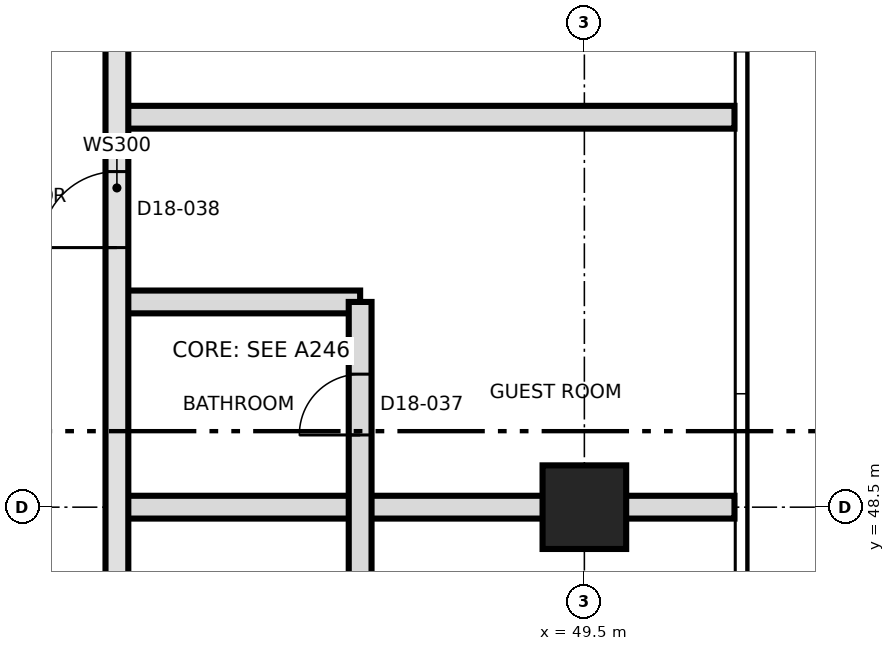
"""IFC4 building model, lengths in metres.
Left out: names, types, materials, properties, quantities, classifications, styles, units other than length and angle.
Written with IfcOpenShell. Run it as: python <this file> out.ifc"""

import sys

from ifc_helpers import new_model, si_unit, direction, frame, frame_2d, origin, origin_2d, place, context, subcontext, project, spatial, rectangle, extrude, element, fill, save


model = new_model("IFC4")
c1 = context("Model", 3, precision=1e-05, world=origin(), true_north=direction((0.0, 1.0)))
c2 = subcontext(c1, "Body", "Model", "MODEL_VIEW")
j1 = project(units=[si_unit("LENGTHUNIT", "METRE"), si_unit("PLANEANGLEUNIT", "RADIAN")], contexts=[c1])
p1 = place(None, origin())
s1 = spatial("IfcSite", under=j1, at=p1, CompositionType="ELEMENT")
p2 = place(p1, origin())
s2 = spatial("IfcBuilding", under=s1, at=p2, CompositionType="ELEMENT")
p3 = place(p2, frame((0.0, 0.0, 175.5)))
s3 = spatial("IfcBuildingStorey", under=s2, at=p3, CompositionType="ELEMENT", Elevation=175.5)
p4 = place(p3, frame((49.5, 48.5, 0.0), z_axis=(0.0, 0.0, 1.0), x_axis=(1.0, 0.0, 0.0)))
e1 = element("IfcColumn", 1, at=p4, inside=s3, PredefinedType="COLUMN", context=c2, shape_type="SweptSolid", body=[
    extrude(rectangle(XDim=1.1, YDim=1.1, at=origin_2d()), origin(), (0.0, 0.0, 1.0), 3.7),
])
p5 = place(p3, frame((43.35, 48.5, 0.0), z_axis=(0.0, 0.0, 1.0), x_axis=(1.0, 0.0, 0.0)))
e2 = element("IfcWall", 2, at=p5, inside=s3, PredefinedType="PARTITIONING", context=c2, shape_type="SweptSolid", body=[
    extrude(rectangle(XDim=8.125, YDim=0.3, at=frame_2d((4.062, 0.0))), origin(), (0.0, 0.0, 1.0), 3.4),
])
p6 = place(p3, frame((43.35, 51.2, 0.0), z_axis=(0.0, 0.0, 1.0), x_axis=(1.0, 0.0, 0.0)))
e3 = element("IfcWall", 3, at=p6, inside=s3, PredefinedType="PARTITIONING", context=c2, shape_type="SweptSolid", body=[
    extrude(rectangle(XDim=3.2, YDim=0.3, at=frame_2d((1.6, 0.0))), origin(), (0.0, 0.0, 1.0), 3.4),
])
p7 = place(p3, frame((43.35, 53.63, 0.0), z_axis=(0.0, 0.0, 1.0), x_axis=(1.0, 0.0, 0.0)))
e4 = element("IfcWall", 4, at=p7, inside=s3, PredefinedType="PARTITIONING", context=c2, shape_type="SweptSolid", body=[
    extrude(rectangle(XDim=8.125, YDim=0.3, at=frame_2d((4.062, 0.0))), origin(), (0.0, 0.0, 1.0), 3.4),
])
p8 = place(p3, frame((43.35, 39.65, 0.0), z_axis=(0.0, 0.0, 1.0), x_axis=(0.0, 1.0, 0.0)))
e5 = element("IfcWall", 5, at=p8, inside=s3, PredefinedType="SOLIDWALL", context=c2, shape_type="SweptSolid", body=[
    extrude(rectangle(XDim=26.1, YDim=0.3, at=frame_2d((13.05, 0.0))), origin(), (0.0, 0.0, 1.0), 3.4),
])
p9 = place(p8, frame((0.985, 0.0, 0.0)))
e6 = element("IfcOpeningElement", 6, at=p9, cuts=e5, PredefinedType="OPENING", context=c2, shape_type="SweptSolid", body=[
    extrude(rectangle(XDim=1.2, YDim=2.1, at=frame_2d((0.6, 1.05))), frame((0.0, 0.16, 0.0), z_axis=(0.0, -1.0, 0.0), x_axis=(1.0, 0.0, 0.0)), (0.0, 0.0, 1.0), 0.32),
])
p10 = place(p8, frame((4.235, 0.0, 0.0)))
e7 = element("IfcOpeningElement", 7, at=p10, cuts=e5, PredefinedType="OPENING", context=c2, shape_type="SweptSolid", body=[
    extrude(rectangle(XDim=1.0, YDim=2.1, at=frame_2d((0.5, 1.05))), frame((0.0, 0.16, 0.0), z_axis=(0.0, -1.0, 0.0), x_axis=(1.0, 0.0, 0.0)), (0.0, 0.0, 1.0), 0.32),
])
p11 = place(p8, frame((12.265, 0.0, 0.0)))
e8 = element("IfcOpeningElement", 8, at=p11, cuts=e5, PredefinedType="OPENING", context=c2, shape_type="SweptSolid", body=[
    extrude(rectangle(XDim=1.0, YDim=2.1, at=frame_2d((0.5, 1.05))), frame((0.0, 0.16, 0.0), z_axis=(0.0, -1.0, 0.0), x_axis=(1.0, 0.0, 0.0)), (0.0, 0.0, 1.0), 0.32),
])
p12 = place(p8, frame((15.215, 0.0, 0.0)))
e9 = element("IfcOpeningElement", 9, at=p12, cuts=e5, PredefinedType="OPENING", context=c2, shape_type="SweptSolid", body=[
    extrude(rectangle(XDim=1.4, YDim=2.1, at=frame_2d((0.7, 1.05))), frame((0.0, 0.16, 0.0), z_axis=(0.0, -1.0, 0.0), x_axis=(1.0, 0.0, 0.0)), (0.0, 0.0, 1.0), 0.32),
])
p13 = place(p8, frame((19.85, 0.0, 0.0)))
e10 = element("IfcOpeningElement", 10, at=p13, cuts=e5, PredefinedType="OPENING", context=c2, shape_type="SweptSolid", body=[
    extrude(rectangle(XDim=1.0, YDim=2.4, at=frame_2d((0.5, 1.2))), frame((0.0, 0.16, 0.0), z_axis=(0.0, -1.0, 0.0), x_axis=(1.0, 0.0, 0.0)), (0.0, 0.0, 1.0), 0.32),
])
p14 = place(p3, frame((46.55, 45.8, 0.0), z_axis=(0.0, 0.0, 1.0), x_axis=(0.0, 1.0, 0.0)))
e11 = element("IfcWall", 11, at=p14, inside=s3, PredefinedType="PARTITIONING", context=c2, shape_type="SweptSolid", body=[
    extrude(rectangle(XDim=5.4, YDim=0.3, at=frame_2d((2.7, 0.0))), origin(), (0.0, 0.0, 1.0), 3.4),
])
p15 = place(p14, frame((0.95, 0.0, 0.0)))
e12 = element("IfcOpeningElement", 12, at=p15, cuts=e11, PredefinedType="OPENING", context=c2, shape_type="SweptSolid", body=[
    extrude(rectangle(XDim=0.8, YDim=2.1, at=frame_2d((0.4, 1.05))), frame((0.0, 0.16, 0.0), z_axis=(0.0, -1.0, 0.0), x_axis=(1.0, 0.0, 0.0)), (0.0, 0.0, 1.0), 0.32),
])
p16 = place(p14, frame((3.65, 0.0, 0.0)))
e13 = element("IfcOpeningElement", 13, at=p16, cuts=e11, PredefinedType="OPENING", context=c2, shape_type="SweptSolid", body=[
    extrude(rectangle(XDim=0.8, YDim=2.1, at=frame_2d((0.4, 1.05))), frame((0.0, 0.16, 0.0), z_axis=(0.0, -1.0, 0.0), x_axis=(1.0, 0.0, 0.0)), (0.0, 0.0, 1.0), 0.32),
])
p17 = place(p16, origin())
e14 = element("IfcDoor", 14, at=p17, inside=s3, OperationType="SINGLE_SWING_RIGHT", PredefinedType="DOOR", context=c2, shape_type="SweptSolid", body=[
    extrude(rectangle(XDim=0.8, YDim=2.1, at=frame_2d((0.4, 1.05))), frame((0.0, 0.025, 0.0), z_axis=(0.0, -1.0, 0.0), x_axis=(1.0, 0.0, 0.0)), (0.0, 0.0, 1.0), 0.05),
])
fill(e13, e14)
p18 = place(p11, origin())
e15 = element("IfcDoor", 15, at=p18, inside=s3, OperationType="SINGLE_SWING_LEFT", PredefinedType="DOOR", context=c2, shape_type="SweptSolid", body=[
    extrude(rectangle(XDim=1.0, YDim=2.1, at=frame_2d((0.5, 1.05))), frame((0.0, 0.025, 0.0), z_axis=(0.0, -1.0, 0.0), x_axis=(1.0, 0.0, 0.0)), (0.0, 0.0, 1.0), 0.05),
])
fill(e8, e15)
save(model, sys.argv[1])
